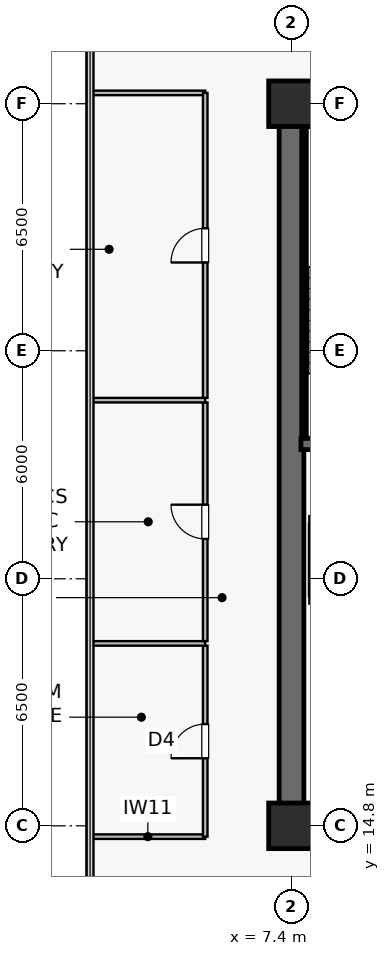
"""IFC4 building model, lengths in metres.
Left out: names, types, materials, properties, quantities, classifications, styles, units other than length and angle.
Written with IfcOpenShell. Run it as: python <this file> out.ifc"""

import sys

from ifc_helpers import new_model, si_unit, direction, frame, frame_2d, origin, origin_2d, place, context, subcontext, project, spatial, rectangle, extrude, source, transform, mapped, element, fill, save


model = new_model("IFC4")
c1 = context("Model", 3, precision=1e-05, world=origin(), true_north=direction((0.0, 1.0)))
c2 = subcontext(c1, "Body", "Model", "MODEL_VIEW")
j1 = project(units=[si_unit("LENGTHUNIT", "METRE"), si_unit("PLANEANGLEUNIT", "RADIAN")], contexts=[c1])
p1 = place(None, origin())
s1 = spatial("IfcSite", under=j1, at=p1, CompositionType="ELEMENT")
p2 = place(p1, origin())
s2 = spatial("IfcBuilding", under=s1, at=p2, CompositionType="ELEMENT")
p3 = place(p2, frame((0.0, 0.0, 174.8)))
s3 = spatial("IfcBuildingStorey", under=s2, at=p3, CompositionType="ELEMENT", Elevation=174.8)
p4 = place(p3, frame((7.075, 14.8, 0.0), z_axis=(0.0, 0.0, 1.0), x_axis=(1.0, 0.0, 0.0)))
e1 = element("IfcWall", 1, at=p4, inside=s3, PredefinedType="SHEAR", context=c2, shape_type="SweptSolid", body=[
    extrude(rectangle(XDim=15.45, YDim=0.65, at=frame_2d((7.725, 0.0))), origin(), (0.0, 0.0, 1.0), 3.79),
])
p5 = place(p3, frame((7.075, 33.8, 0.0), z_axis=(0.0, 0.0, 1.0), x_axis=(1.0, 0.0, 0.0)))
e2 = element("IfcWall", 2, at=p5, inside=s3, PredefinedType="SHEAR", context=c2, shape_type="SweptSolid", body=[
    extrude(rectangle(XDim=15.45, YDim=0.65, at=frame_2d((7.725, 0.0))), origin(), (0.0, 0.0, 1.0), 3.79),
])
p6 = place(p5, frame((8.375, 0.0, 0.0)))
e3 = element("IfcOpeningElement", 3, at=p6, cuts=e2, PredefinedType="OPENING", context=c2, shape_type="SweptSolid", body=[
    extrude(rectangle(XDim=0.95, YDim=2.15, at=frame_2d((0.475, 1.075))), frame((0.0, 0.335, 0.0), z_axis=(0.0, -1.0, 0.0), x_axis=(1.0, 0.0, 0.0)), (0.0, 0.0, 1.0), 0.67),
])
p7 = place(p5, frame((11.915, 0.0, 0.0)))
e4 = element("IfcOpeningElement", 4, at=p7, cuts=e2, PredefinedType="OPENING", context=c2, shape_type="SweptSolid", body=[
    extrude(rectangle(XDim=0.95, YDim=2.15, at=frame_2d((0.475, 1.075))), frame((0.0, 0.335, 0.0), z_axis=(0.0, -1.0, 0.0), x_axis=(1.0, 0.0, 0.0)), (0.0, 0.0, 1.0), 0.67),
])
p8 = place(p3, frame((7.4, 15.125, 0.0), z_axis=(0.0, 0.0, 1.0), x_axis=(0.0, 1.0, 0.0)))
e5 = element("IfcWall", 5, at=p8, inside=s3, PredefinedType="SHEAR", context=c2, shape_type="SweptSolid", body=[
    extrude(rectangle(XDim=18.35, YDim=0.65, at=frame_2d((9.175, 0.0))), origin(), (0.0, 0.0, 1.0), 3.79),
])
p9 = place(p3, frame((7.65, 24.85, 0.0), z_axis=(0.0, 0.0, 1.0), x_axis=(1.0, 0.0, 0.0)))
e6 = element("IfcWall", 6, at=p9, inside=s3, PredefinedType="SHEAR", context=c2, shape_type="SweptSolid", body=[
    extrude(rectangle(XDim=3.8, YDim=0.3, at=frame_2d((1.9, 0.0))), origin(), (0.0, 0.0, 1.0), 3.79),
])
p10 = place(p3, frame((7.73, 33.4, 0.0), z_axis=(0.0, 0.0, 1.0), x_axis=(1.0, 0.0, 0.0)))
e7 = element("IfcWall", 7, at=p10, inside=s3, PredefinedType="SOLIDWALL", context=c2, shape_type="SweptSolid", body=[
    extrude(rectangle(XDim=3.72, YDim=0.12, at=frame_2d((1.86, 0.0))), origin(), (0.0, 0.0, 1.0), 3.79),
])
p11 = place(p3, frame((7.73, 25.0, 0.0), z_axis=(0.0, 0.0, 1.0), x_axis=(0.0, 1.0, 0.0)))
e8 = element("IfcWall", 8, at=p11, inside=s3, PredefinedType="SOLIDWALL", context=c2, shape_type="SweptSolid", body=[
    extrude(rectangle(XDim=8.32, YDim=0.12, at=frame_2d((4.16, 0.0))), origin(), (0.0, 0.0, 1.0), 3.79),
])
m1 = source(origin(), c2, "Body", "SweptSolid", [
    extrude(rectangle(XDim=1.2, YDim=1.2, at=origin_2d()), origin(), (0.0, 0.0, 1.0), 4.1),
])
for number, where, z_axis, x_axis in (
    (9, (7.4, 14.8, 0.0), (0.0, 0.0, 1.0), (1.0, 0.0, 0.0)),
    (10, (7.4, 33.8, 0.0), (0.0, 0.0, 1.0), (1.0, 0.0, 0.0)),
):
    element("IfcColumn", number, at=place(p3, frame(where, z_axis=z_axis, x_axis=x_axis)), inside=s3, PredefinedType="COLUMN", context=c2, shape_type="MappedRepresentation", body=[
        mapped(m1, transform((0.0, 0.0, 0.0), scale=1.0)),
    ])
for number, where, z_axis, x_axis in (
    (11, (7.87, 20.75, 0.0), (0.0, 0.0, 1.0), (1.0, 0.0, 0.0)),
    (12, (7.87, 22.85, 0.0), (0.0, 0.0, 1.0), (1.0, 0.0, 0.0)),
):
    element("IfcWall", number, at=place(p3, frame(where, z_axis=z_axis, x_axis=x_axis)), inside=s3, PredefinedType="SOLIDWALL", context=c2, shape_type="SweptSolid", body=[
        extrude(rectangle(XDim=2.26, YDim=0.2, at=frame_2d((1.13, 0.0))), origin(), (0.0, 0.0, 1.0), 3.79),
    ])
p12 = place(p3, frame((7.95, 20.85, 0.0), z_axis=(0.0, 0.0, 1.0), x_axis=(0.0, 1.0, 0.0)))
e13 = element("IfcWall", 13, at=p12, inside=s3, PredefinedType="SOLIDWALL", context=c2, shape_type="SweptSolid", body=[
    extrude(rectangle(XDim=1.9, YDim=0.18, at=frame_2d((0.95, 0.0))), origin(), (0.0, 0.0, 1.0), 3.79),
])
for number, where, z_axis, x_axis in (
    (14, (2.11, 14.515, 0.0), (0.0, 0.0, 1.0), (1.0, 0.0, 0.0)),
    (15, (2.11, 34.085, 0.0), (0.0, 0.0, 1.0), (1.0, 0.0, 0.0)),
):
    element("IfcWall", number, at=place(p3, frame(where, z_axis=z_axis, x_axis=x_axis)), inside=s3, PredefinedType="PARTITIONING", context=c2, shape_type="SweptSolid", body=[
        extrude(rectangle(XDim=3.02, YDim=0.12, at=frame_2d((1.51, 0.0))), origin(), (0.0, 0.0, 1.0), 3.79),
    ])
p13 = place(p3, frame((5.13, 14.515, 0.0), z_axis=(0.0, 0.0, 1.0), x_axis=(0.0, 1.0, 0.0)))
e16 = element("IfcWall", 16, at=p13, inside=s3, PredefinedType="PARTITIONING", context=c2, shape_type="SweptSolid", body=[
    extrude(rectangle(XDim=5.025, YDim=0.12, at=frame_2d((2.513, 0.0))), origin(), (0.0, 0.0, 1.0), 3.79),
])
p14 = place(p13, frame((2.062, 0.0, 0.0)))
e17 = element("IfcOpeningElement", 17, at=p14, cuts=e16, PredefinedType="OPENING", context=c2, shape_type="SweptSolid", body=[
    extrude(rectangle(XDim=0.9, YDim=2.1, at=frame_2d((0.45, 1.05))), frame((0.0, 0.07, 0.0), z_axis=(0.0, -1.0, 0.0), x_axis=(1.0, 0.0, 0.0)), (0.0, 0.0, 1.0), 0.14),
])
p15 = place(p3, frame((2.11, 19.6, 0.0), z_axis=(0.0, 0.0, 1.0), x_axis=(1.0, 0.0, 0.0)))
e18 = element("IfcWall", 18, at=p15, inside=s3, PredefinedType="PARTITIONING", context=c2, shape_type="SweptSolid", body=[
    extrude(rectangle(XDim=3.02, YDim=0.12, at=frame_2d((1.51, 0.0))), origin(), (0.0, 0.0, 1.0), 3.79),
])
p16 = place(p3, frame((5.13, 19.66, 0.0), z_axis=(0.0, 0.0, 1.0), x_axis=(0.0, 1.0, 0.0)))
e19 = element("IfcWall", 19, at=p16, inside=s3, PredefinedType="PARTITIONING", context=c2, shape_type="SweptSolid", body=[
    extrude(rectangle(XDim=6.28, YDim=0.12, at=frame_2d((3.14, 0.0))), origin(), (0.0, 0.0, 1.0), 3.79),
])
p17 = place(p16, frame((2.69, 0.0, 0.0)))
e20 = element("IfcOpeningElement", 20, at=p17, cuts=e19, PredefinedType="OPENING", context=c2, shape_type="SweptSolid", body=[
    extrude(rectangle(XDim=0.9, YDim=2.1, at=frame_2d((0.45, 1.05))), frame((0.0, 0.07, 0.0), z_axis=(0.0, -1.0, 0.0), x_axis=(1.0, 0.0, 0.0)), (0.0, 0.0, 1.0), 0.14),
])
p18 = place(p3, frame((2.11, 26.0, 0.0), z_axis=(0.0, 0.0, 1.0), x_axis=(1.0, 0.0, 0.0)))
e21 = element("IfcWall", 21, at=p18, inside=s3, PredefinedType="PARTITIONING", context=c2, shape_type="SweptSolid", body=[
    extrude(rectangle(XDim=3.02, YDim=0.12, at=frame_2d((1.51, 0.0))), origin(), (0.0, 0.0, 1.0), 3.79),
])
p19 = place(p3, frame((5.13, 26.06, 0.0), z_axis=(0.0, 0.0, 1.0), x_axis=(0.0, 1.0, 0.0)))
e22 = element("IfcWall", 22, at=p19, inside=s3, PredefinedType="PARTITIONING", context=c2, shape_type="SweptSolid", body=[
    extrude(rectangle(XDim=8.025, YDim=0.12, at=frame_2d((4.012, 0.0))), origin(), (0.0, 0.0, 1.0), 3.79),
])
p20 = place(p19, frame((3.562, 0.0, 0.0)))
e23 = element("IfcOpeningElement", 23, at=p20, cuts=e22, PredefinedType="OPENING", context=c2, shape_type="SweptSolid", body=[
    extrude(rectangle(XDim=0.9, YDim=2.1, at=frame_2d((0.45, 1.05))), frame((0.0, 0.07, 0.0), z_axis=(0.0, -1.0, 0.0), x_axis=(1.0, 0.0, 0.0)), (0.0, 0.0, 1.0), 0.14),
])
m2 = source(origin(), c2, "Body", "SweptSolid", [
    extrude(rectangle(XDim=0.9, YDim=2.1, at=frame_2d((0.45, 1.05))), frame((0.0, 0.025, 0.0), z_axis=(0.0, -1.0, 0.0), x_axis=(1.0, 0.0, 0.0)), (0.0, 0.0, 1.0), 0.05),
])
p21 = place(p14, origin())
e24 = element("IfcDoor", 24, at=p21, inside=s3, OperationType="SINGLE_SWING_LEFT", PredefinedType="DOOR", context=c2, shape_type="MappedRepresentation", body=[
    mapped(m2, transform((0.0, 0.0, 0.0), scale=1.0)),
])
fill(e17, e24)
p22 = place(p17, origin())
e25 = element("IfcDoor", 25, at=p22, inside=s3, OperationType="SINGLE_SWING_RIGHT", PredefinedType="DOOR", context=c2, shape_type="MappedRepresentation", body=[
    mapped(m2, transform((0.0, 0.0, 0.0), scale=1.0)),
])
fill(e20, e25)
p23 = place(p20, origin())
e26 = element("IfcDoor", 26, at=p23, inside=s3, OperationType="SINGLE_SWING_LEFT", PredefinedType="DOOR", context=c2, shape_type="MappedRepresentation", body=[
    mapped(m2, transform((0.0, 0.0, 0.0), scale=1.0)),
])
fill(e23, e26)
save(model, sys.argv[1])
